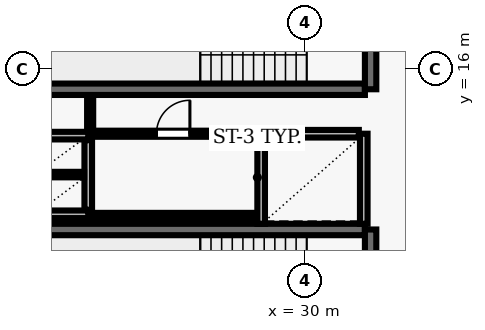
"""IFC4 building model, lengths in metres.
Left out: names, types, materials, properties, quantities, classifications, styles, units other than length and angle.
Written with IfcOpenShell. Run it as: python <this file> out.ifc"""

import sys

from ifc_helpers import new_model, si_unit, direction, frame, frame_2d, origin, place, context, subcontext, project, spatial, rectangle, extrude, element, fill, save


model = new_model("IFC4")
c1 = context("Model", 3, precision=1e-05, world=origin(), true_north=direction((0.0, 1.0)))
c2 = subcontext(c1, "Body", "Model", "MODEL_VIEW")
j1 = project(units=[si_unit("LENGTHUNIT", "METRE"), si_unit("PLANEANGLEUNIT", "RADIAN")], contexts=[c1])
p1 = place(None, origin())
s1 = spatial("IfcSite", under=j1, at=p1, CompositionType="ELEMENT")
p2 = place(p1, origin())
s2 = spatial("IfcBuilding", under=s1, at=p2, CompositionType="ELEMENT")
p3 = place(p2, frame((0.0, 0.0, 134.6)))
s3 = spatial("IfcBuildingStorey", under=s2, at=p3, CompositionType="ELEMENT", Elevation=134.6)
p4 = place(p3, frame((23.22, 15.47, 0.0), z_axis=(0.0, 0.0, 1.0), x_axis=(1.0, 0.0, 0.0)))
e1 = element("IfcWall", 1, at=p4, inside=s3, PredefinedType="SHEAR", context=c2, shape_type="SweptSolid", body=[
    extrude(rectangle(XDim=8.36, YDim=0.3, at=frame_2d((4.18, 0.0))), origin(), (0.0, 0.0, 1.0), 3.69),
])
p5 = place(p3, frame((31.73, 15.47, 0.0), z_axis=(0.0, 0.0, 1.0), x_axis=(0.0, 1.0, 0.0)))
e2 = element("IfcWall", 2, at=p5, inside=s3, PredefinedType="SHEAR", context=c2, shape_type="SweptSolid", body=[
    extrude(rectangle(XDim=3.51, YDim=0.3, at=frame_2d((1.755, 0.0))), origin(), (0.0, 0.0, 1.0), 3.69),
])
p6 = place(p5, frame((1.18, 0.0, 0.0)))
e3 = element("IfcOpeningElement", 3, at=p6, cuts=e2, PredefinedType="OPENING", context=c2, shape_type="SweptSolid", body=[
    extrude(rectangle(XDim=1.15, YDim=2.15, at=frame_2d((0.575, 1.075))), frame((0.0, 0.16, 0.0), z_axis=(0.0, -1.0, 0.0), x_axis=(1.0, 0.0, 0.0)), (0.0, 0.0, 1.0), 0.32),
])
p7 = place(p3, frame((31.58, 11.78, 0.0), z_axis=(0.0, 0.0, 1.0), x_axis=(-1.0, 0.0, 0.0)))
e4 = element("IfcWall", 4, at=p7, inside=s3, PredefinedType="SHEAR", context=c2, shape_type="SweptSolid", body=[
    extrude(rectangle(XDim=8.36, YDim=0.3, at=frame_2d((4.18, 0.0))), origin(), (0.0, 0.0, 1.0), 3.69),
])
p8 = place(p3, frame((31.73, 8.27, 0.0), z_axis=(0.0, 0.0, 1.0), x_axis=(0.0, 1.0, 0.0)))
e5 = element("IfcWall", 5, at=p8, inside=s3, PredefinedType="SHEAR", context=c2, shape_type="SweptSolid", body=[
    extrude(rectangle(XDim=3.51, YDim=0.3, at=frame_2d((1.755, 0.0))), origin(), (0.0, 0.0, 1.0), 3.69),
])
p9 = place(p8, frame((1.18, 0.0, 0.0)))
e6 = element("IfcOpeningElement", 6, at=p9, cuts=e5, PredefinedType="OPENING", context=c2, shape_type="SweptSolid", body=[
    extrude(rectangle(XDim=1.15, YDim=2.15, at=frame_2d((0.575, 1.075))), frame((0.0, 0.16, 0.0), z_axis=(0.0, -1.0, 0.0), x_axis=(1.0, 0.0, 0.0)), (0.0, 0.0, 1.0), 0.32),
])
for number, where, z_axis, x_axis in (
    (7, (28.85, 14.3, 0.0), (0.0, 0.0, 1.0), (0.0, -1.0, 0.0)),
    (8, (31.55, 11.93, 0.0), (0.0, 0.0, 1.0), (0.0, 1.0, 0.0)),
):
    element("IfcWall", number, at=place(p3, frame(where, z_axis=z_axis, x_axis=x_axis)), inside=s3, PredefinedType="SOLIDWALL", context=c2, shape_type="SweptSolid", body=[
        extrude(rectangle(XDim=2.37, YDim=0.2, at=frame_2d((1.185, 0.0))), origin(), (0.0, 0.0, 1.0), 3.69),
    ])
p10 = place(p3, frame((31.42, 14.3, 0.0), z_axis=(0.0, 0.0, 1.0), x_axis=(-1.0, 0.0, 0.0)))
e9 = element("IfcWall", 9, at=p10, inside=s3, PredefinedType="SOLIDWALL", context=c2, shape_type="SweptSolid", body=[
    extrude(rectangle(XDim=2.44, YDim=0.2, at=frame_2d((1.22, 0.0))), origin(), (0.0, 0.0, 1.0), 3.69),
])
for number, where, z_axis, x_axis in (
    (10, (22.9, 14.25, 0.0), (0.0, 0.0, 1.0), (1.0, 0.0, 0.0)),
    (11, (22.9, 12.18, 0.0), (0.0, 0.0, 1.0), (1.0, 0.0, 0.0)),
):
    element("IfcWall", number, at=place(p3, frame(where, z_axis=z_axis, x_axis=x_axis)), inside=s3, PredefinedType="SOLIDWALL", context=c2, shape_type="SweptSolid", body=[
        extrude(rectangle(XDim=1.4, YDim=0.2, at=frame_2d((0.7, 0.0))), origin(), (0.0, 0.0, 1.0), 3.69),
    ])
p11 = place(p3, frame((24.3, 12.3, 0.0), z_axis=(0.0, 0.0, 1.0), x_axis=(0.0, 1.0, 0.0)))
e12 = element("IfcWall", 12, at=p11, inside=s3, PredefinedType="SOLIDWALL", context=c2, shape_type="SweptSolid", body=[
    extrude(rectangle(XDim=1.83, YDim=0.2, at=frame_2d((0.915, 0.0))), origin(), (0.0, 0.0, 1.0), 3.69),
])
p12 = place(p3, frame((23.01, 13.225, 0.0), z_axis=(0.0, 0.0, 1.0), x_axis=(1.0, 0.0, 0.0)))
e13 = element("IfcWall", 13, at=p12, inside=s3, PredefinedType="PARTITIONING", context=c2, shape_type="SweptSolid", body=[
    extrude(rectangle(XDim=1.18, YDim=0.145, at=frame_2d((0.59, 0.0))), origin(), (0.0, 0.0, 1.0), 3.69),
])
p13 = place(p3, frame((24.35, 12.15, 0.0), z_axis=(0.0, 0.0, 1.0), x_axis=(1.0, 0.0, 0.0)))
e14 = element("IfcWall", 14, at=p13, inside=s3, PredefinedType="PARTITIONING", context=c2, shape_type="SweptSolid", body=[
    extrude(rectangle(XDim=4.37, YDim=0.135, at=frame_2d((2.185, 0.0))), origin(), (0.0, 0.0, 1.0), 3.69),
])
p14 = place(p3, frame((24.35, 14.3, 0.0), z_axis=(0.0, 0.0, 1.0), x_axis=(1.0, 0.0, 0.0)))
e15 = element("IfcWall", 15, at=p14, inside=s3, PredefinedType="PARTITIONING", context=c2, shape_type="SweptSolid", body=[
    extrude(rectangle(XDim=4.37, YDim=0.16, at=frame_2d((2.185, 0.0))), origin(), (0.0, 0.0, 1.0), 3.69),
])
p15 = place(p14, frame((1.745, 0.0, 0.0)))
e16 = element("IfcOpeningElement", 16, at=p15, cuts=e15, PredefinedType="OPENING", context=c2, shape_type="SweptSolid", body=[
    extrude(rectangle(XDim=0.88, YDim=2.1, at=frame_2d((0.44, 1.05))), frame((0.0, 0.09, 0.0), z_axis=(0.0, -1.0, 0.0), x_axis=(1.0, 0.0, 0.0)), (0.0, 0.0, 1.0), 0.18),
])
p16 = place(p3, frame((24.35, 15.29, 0.0), z_axis=(0.0, 0.0, 1.0), x_axis=(0.0, -1.0, 0.0)))
e17 = element("IfcWall", 17, at=p16, inside=s3, PredefinedType="PARTITIONING", context=c2, shape_type="SweptSolid", body=[
    extrude(rectangle(XDim=0.915, YDim=0.16, at=frame_2d((0.458, 0.0))), origin(), (0.0, 0.0, 1.0), 3.69),
])
p17 = place(p15, origin())
e18 = element("IfcDoor", 18, at=p17, inside=s3, OperationType="SINGLE_SWING_RIGHT", PredefinedType="DOOR", context=c2, shape_type="SweptSolid", body=[
    extrude(rectangle(XDim=0.88, YDim=2.1, at=frame_2d((0.44, 1.05))), frame((0.0, 0.025, 0.0), z_axis=(0.0, -1.0, 0.0), x_axis=(1.0, 0.0, 0.0)), (0.0, 0.0, 1.0), 0.05),
])
fill(e16, e18)
save(model, sys.argv[1])
